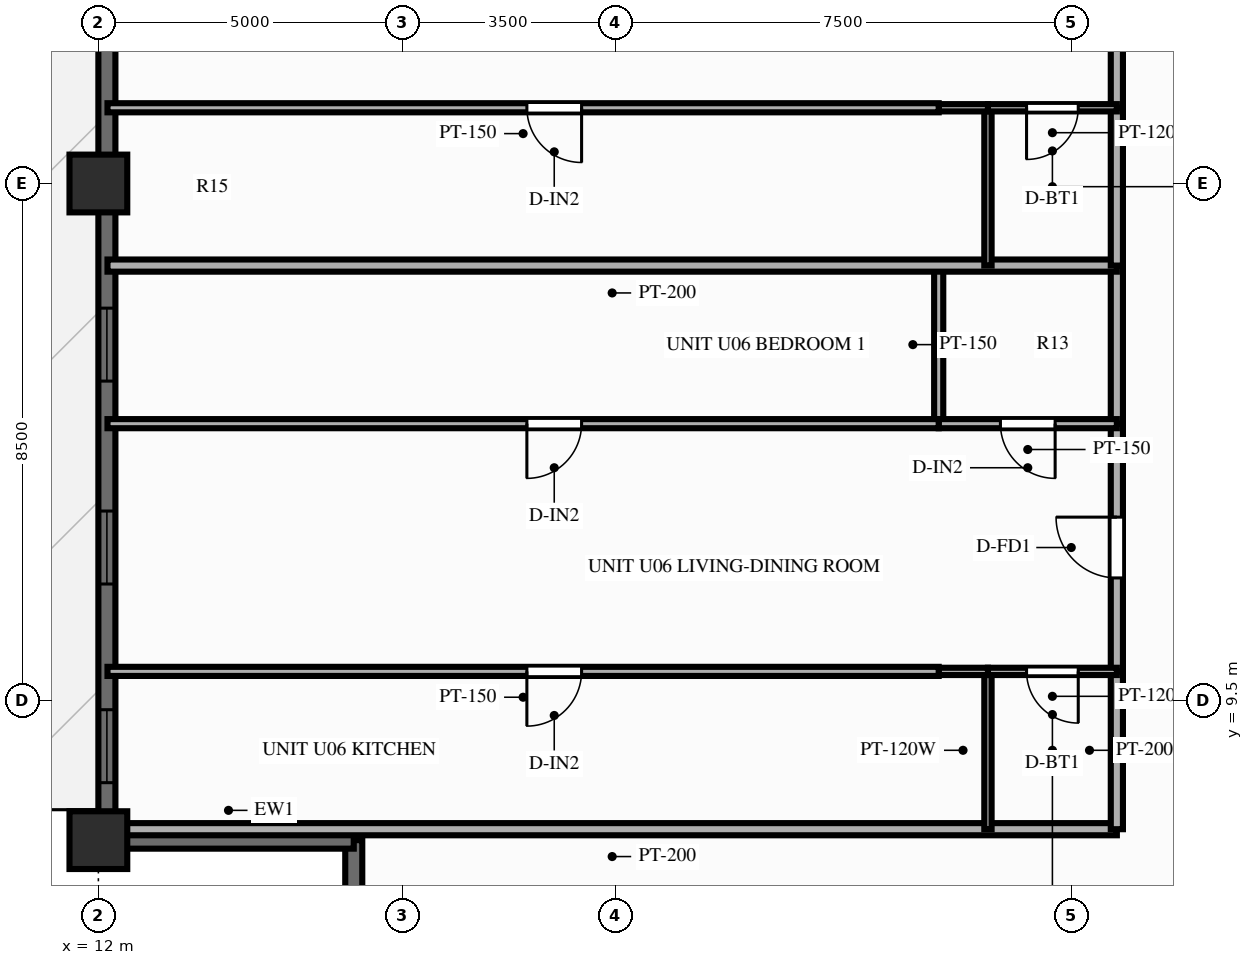
"""IFC4 building model, lengths in metres.
Left out: names, types, materials, properties, quantities, classifications, styles, units other than length and angle.
Written with IfcOpenShell. Run it as: python <this file> out.ifc"""

import sys

from ifc_helpers import new_model, si_unit, direction, frame, frame_2d, origin, origin_2d, place, context, subcontext, project, spatial, rectangle, extrude, source, transform, mapped, element, fill, save


model = new_model("IFC4")
c1 = context("Model", 3, precision=1e-05, world=origin(), true_north=direction((0.0, 1.0)))
c2 = subcontext(c1, "Body", "Model", "MODEL_VIEW")
j1 = project(units=[si_unit("LENGTHUNIT", "METRE"), si_unit("PLANEANGLEUNIT", "RADIAN")], contexts=[c1])
p1 = place(None, origin())
s1 = spatial("IfcSite", under=j1, at=p1, CompositionType="ELEMENT")
p2 = place(p1, origin())
s2 = spatial("IfcBuilding", under=s1, at=p2, CompositionType="ELEMENT")
p3 = place(p2, frame((0.0, 0.0, 110.85)))
s3 = spatial("IfcBuildingStorey", under=s2, at=p3, CompositionType="ELEMENT", Elevation=110.85)
m1 = source(origin(), c2, "Body", "SweptSolid", [
    extrude(rectangle(XDim=0.95, YDim=0.95, at=origin_2d()), origin(), (0.0, 0.0, 1.0), 3.0),
])
for number, where, z_axis, x_axis in (
    (1, (12.0, 18.0, 0.0), (0.0, 0.0, 1.0), (1.0, 0.0, 0.0)),
    (2, (12.0, 7.2, 0.0), (0.0, 0.0, 1.0), (1.0, 0.0, 0.0)),
):
    element("IfcColumn", number, at=place(p3, frame(where, z_axis=z_axis, x_axis=x_axis)), inside=s3, PredefinedType="COLUMN", context=c2, shape_type="MappedRepresentation", body=[
        mapped(m1, transform((0.0, 0.0, 0.0), scale=1.0)),
    ])
p4 = place(p3, frame((12.14, 7.2, 0.0), z_axis=(0.0, 0.0, 1.0), x_axis=(0.0, 1.0, 0.0)))
e3 = element("IfcWall", 3, at=p4, inside=s3, PredefinedType="SOLIDWALL", context=c2, shape_type="SweptSolid", body=[
    extrude(rectangle(XDim=39.6, YDim=0.28, at=frame_2d((19.8, 0.0))), origin(), (0.0, 0.0, 1.0), 2.28),
])
p5 = place(p4, frame((0.945, 0.0, 0.25)))
e4 = element("IfcOpeningElement", 4, at=p5, cuts=e3, PredefinedType="OPENING", context=c2, shape_type="SweptSolid", body=[
    extrude(rectangle(XDim=1.2, YDim=1.5, at=frame_2d((0.6, 0.75))), frame((0.0, 0.152, 0.0), z_axis=(0.0, -1.0, 0.0), x_axis=(1.0, 0.0, 0.0)), (0.0, 0.0, 1.0), 0.304),
])
p6 = place(p4, frame((4.213, 0.0, 0.25)))
e5 = element("IfcOpeningElement", 5, at=p6, cuts=e3, PredefinedType="OPENING", context=c2, shape_type="SweptSolid", body=[
    extrude(rectangle(XDim=1.2, YDim=1.5, at=frame_2d((0.6, 0.75))), frame((0.0, 0.152, 0.0), z_axis=(0.0, -1.0, 0.0), x_axis=(1.0, 0.0, 0.0)), (0.0, 0.0, 1.0), 0.304),
])
p7 = place(p4, frame((7.55, 0.0, 0.25)))
e6 = element("IfcOpeningElement", 6, at=p7, cuts=e3, PredefinedType="OPENING", context=c2, shape_type="SweptSolid", body=[
    extrude(rectangle(XDim=1.2, YDim=1.5, at=frame_2d((0.6, 0.75))), frame((0.0, 0.152, 0.0), z_axis=(0.0, -1.0, 0.0), x_axis=(1.0, 0.0, 0.0)), (0.0, 0.0, 1.0), 0.304),
])
p8 = place(p4, frame((13.483, 0.0, 0.25)))
e7 = element("IfcOpeningElement", 7, at=p8, cuts=e3, PredefinedType="OPENING", context=c2, shape_type="SweptSolid", body=[
    extrude(rectangle(XDim=1.2, YDim=1.5, at=frame_2d((0.6, 0.75))), frame((0.0, 0.152, 0.0), z_axis=(0.0, -1.0, 0.0), x_axis=(1.0, 0.0, 0.0)), (0.0, 0.0, 1.0), 0.304),
])
p9 = place(p4, frame((16.82, 0.0, 0.25)))
e8 = element("IfcOpeningElement", 8, at=p9, cuts=e3, PredefinedType="OPENING", context=c2, shape_type="SweptSolid", body=[
    extrude(rectangle(XDim=1.2, YDim=1.5, at=frame_2d((0.6, 0.75))), frame((0.0, 0.152, 0.0), z_axis=(0.0, -1.0, 0.0), x_axis=(1.0, 0.0, 0.0)), (0.0, 0.0, 1.0), 0.304),
])
p10 = place(p4, frame((19.2, 0.0, 0.25)))
e9 = element("IfcOpeningElement", 9, at=p10, cuts=e3, PredefinedType="OPENING", context=c2, shape_type="SweptSolid", body=[
    extrude(rectangle(XDim=1.2, YDim=1.5, at=frame_2d((0.6, 0.75))), frame((0.0, 0.152, 0.0), z_axis=(0.0, -1.0, 0.0), x_axis=(1.0, 0.0, 0.0)), (0.0, 0.0, 1.0), 0.304),
])
p11 = place(p4, frame((21.578, 0.0, 0.25)))
e10 = element("IfcOpeningElement", 10, at=p11, cuts=e3, PredefinedType="OPENING", context=c2, shape_type="SweptSolid", body=[
    extrude(rectangle(XDim=1.2, YDim=1.5, at=frame_2d((0.6, 0.75))), frame((0.0, 0.152, 0.0), z_axis=(0.0, -1.0, 0.0), x_axis=(1.0, 0.0, 0.0)), (0.0, 0.0, 1.0), 0.304),
])
p12 = place(p4, frame((24.713, 0.0, 0.0)))
e11 = element("IfcOpeningElement", 11, at=p12, cuts=e3, PredefinedType="OPENING", context=c2, shape_type="SweptSolid", body=[
    extrude(rectangle(XDim=1.6, YDim=2.15, at=frame_2d((0.8, 1.075))), frame((0.0, 0.152, 0.0), z_axis=(0.0, -1.0, 0.0), x_axis=(1.0, 0.0, 0.0)), (0.0, 0.0, 1.0), 0.304),
])
p13 = place(p4, frame((29.305, 0.0, 0.25)))
e12 = element("IfcOpeningElement", 12, at=p13, cuts=e3, PredefinedType="OPENING", context=c2, shape_type="SweptSolid", body=[
    extrude(rectangle(XDim=0.7, YDim=1.5, at=frame_2d((0.35, 0.75))), frame((0.0, 0.152, 0.0), z_axis=(0.0, -1.0, 0.0), x_axis=(1.0, 0.0, 0.0)), (0.0, 0.0, 1.0), 0.304),
])
p14 = place(p4, frame((30.848, 0.0, 0.25)))
e13 = element("IfcOpeningElement", 13, at=p14, cuts=e3, PredefinedType="OPENING", context=c2, shape_type="SweptSolid", body=[
    extrude(rectangle(XDim=1.2, YDim=1.5, at=frame_2d((0.6, 0.75))), frame((0.0, 0.152, 0.0), z_axis=(0.0, -1.0, 0.0), x_axis=(1.0, 0.0, 0.0)), (0.0, 0.0, 1.0), 0.304),
])
p15 = place(p4, frame((34.183, 0.0, 0.25)))
e14 = element("IfcOpeningElement", 14, at=p15, cuts=e3, PredefinedType="OPENING", context=c2, shape_type="SweptSolid", body=[
    extrude(rectangle(XDim=1.2, YDim=1.5, at=frame_2d((0.6, 0.75))), frame((0.0, 0.152, 0.0), z_axis=(0.0, -1.0, 0.0), x_axis=(1.0, 0.0, 0.0)), (0.0, 0.0, 1.0), 0.304),
])
p16 = place(p4, frame((37.452, 0.0, 0.25)))
e15 = element("IfcOpeningElement", 15, at=p16, cuts=e3, PredefinedType="OPENING", context=c2, shape_type="SweptSolid", body=[
    extrude(rectangle(XDim=1.2, YDim=1.5, at=frame_2d((0.6, 0.75))), frame((0.0, 0.152, 0.0), z_axis=(0.0, -1.0, 0.0), x_axis=(1.0, 0.0, 0.0)), (0.0, 0.0, 1.0), 0.304),
])
for number, where, z_axis, x_axis in (
    (16, (16.2, 3.08, 0.0), (0.0, 0.0, 1.0), (0.0, 1.0, 0.0)),
    (17, (12.08, 7.2, 0.0), (0.0, 0.0, 1.0), (1.0, 0.0, 0.0)),
):
    element("IfcWall", number, at=place(p3, frame(where, z_axis=z_axis, x_axis=x_axis)), inside=s3, PredefinedType="SOLIDWALL", context=c2, shape_type="SweptSolid", body=[
        extrude(rectangle(XDim=4.12, YDim=0.28, at=frame_2d((2.06, 0.0))), origin(), (0.0, 0.0, 1.0), 2.28),
    ])
p17 = place(p3, frame((28.75, 7.38, 0.0), z_axis=(0.0, 0.0, 1.0), x_axis=(-1.0, 0.0, 0.0)))
e18 = element("IfcWall", 18, at=p17, inside=s3, PredefinedType="PARTITIONING", context=c2, shape_type="SweptSolid", body=[
    extrude(rectangle(XDim=16.6, YDim=0.2, at=frame_2d((8.3, 0.0))), origin(), (0.0, 0.0, 1.0), 2.79),
])
p18 = place(p3, frame((28.75, 7.38, 0.0), z_axis=(0.0, 0.0, 1.0), x_axis=(0.0, 1.0, 0.0)))
e19 = element("IfcWall", 19, at=p18, inside=s3, PredefinedType="PARTITIONING", context=c2, shape_type="SweptSolid", body=[
    extrude(rectangle(XDim=2.596, YDim=0.2, at=frame_2d((1.298, 0.0))), origin(), (0.0, 0.0, 1.0), 2.79),
])
p19 = place(p3, frame((28.75, 9.976, 0.0), z_axis=(0.0, 0.0, 1.0), x_axis=(0.0, 1.0, 0.0)))
e20 = element("IfcWall", 20, at=p19, inside=s3, PredefinedType="PARTITIONING", context=c2, shape_type="SweptSolid", body=[
    extrude(rectangle(XDim=4.074, YDim=0.2, at=frame_2d((2.037, 0.0))), origin(), (0.0, 0.0, 1.0), 2.79),
])
p20 = place(p19, frame((1.537, 0.0, 0.0)))
e21 = element("IfcOpeningElement", 21, at=p20, cuts=e20, PredefinedType="OPENING", context=c2, shape_type="SweptSolid", body=[
    extrude(rectangle(XDim=1.0, YDim=2.15, at=frame_2d((0.5, 1.075))), frame((0.0, 0.112, 0.0), z_axis=(0.0, -1.0, 0.0), x_axis=(1.0, 0.0, 0.0)), (0.0, 0.0, 1.0), 0.224),
])
p21 = place(p3, frame((28.75, 14.05, 0.0), z_axis=(0.0, 0.0, 1.0), x_axis=(0.0, 1.0, 0.0)))
e22 = element("IfcWall", 22, at=p21, inside=s3, PredefinedType="PARTITIONING", context=c2, shape_type="SweptSolid", body=[
    extrude(rectangle(XDim=2.6, YDim=0.2, at=frame_2d((1.3, 0.0))), origin(), (0.0, 0.0, 1.0), 2.79),
])
p22 = place(p3, frame((26.63, 7.38, 0.0), z_axis=(0.0, 0.0, 1.0), x_axis=(0.0, 1.0, 0.0)))
e23 = element("IfcWall", 23, at=p22, inside=s3, PredefinedType="PARTITIONING", context=c2, shape_type="SweptSolid", body=[
    extrude(rectangle(XDim=2.596, YDim=0.12, at=frame_2d((1.298, 0.0))), origin(), (0.0, 0.0, 1.0), 2.79),
])
p23 = place(p3, frame((25.82, 14.05, 0.0), z_axis=(0.0, 0.0, 1.0), x_axis=(0.0, 1.0, 0.0)))
e24 = element("IfcWall", 24, at=p23, inside=s3, PredefinedType="PARTITIONING", context=c2, shape_type="SweptSolid", body=[
    extrude(rectangle(XDim=2.6, YDim=0.15, at=frame_2d((1.3, 0.0))), origin(), (0.0, 0.0, 1.0), 2.79),
])
p24 = place(p3, frame((28.75, 9.976, 0.0), z_axis=(0.0, 0.0, 1.0), x_axis=(-1.0, 0.0, 0.0)))
e25 = element("IfcWall", 25, at=p24, inside=s3, PredefinedType="PARTITIONING", context=c2, shape_type="SweptSolid", body=[
    extrude(rectangle(XDim=2.12, YDim=0.12, at=frame_2d((1.06, 0.0))), origin(), (0.0, 0.0, 1.0), 2.79),
])
p25 = place(p24, frame((0.635, 0.0, 0.0)))
e26 = element("IfcOpeningElement", 26, at=p25, cuts=e25, PredefinedType="OPENING", context=c2, shape_type="SweptSolid", body=[
    extrude(rectangle(XDim=0.85, YDim=2.05, at=frame_2d((0.425, 1.025))), frame((0.0, 0.072, 0.0), z_axis=(0.0, -1.0, 0.0), x_axis=(1.0, 0.0, 0.0)), (0.0, 0.0, 1.0), 0.144),
])
p26 = place(p3, frame((26.63, 9.976, 0.0), z_axis=(0.0, 0.0, 1.0), x_axis=(-1.0, 0.0, 0.0)))
e27 = element("IfcWall", 27, at=p26, inside=s3, PredefinedType="PARTITIONING", context=c2, shape_type="SweptSolid", body=[
    extrude(rectangle(XDim=0.81, YDim=0.12, at=frame_2d((0.405, 0.0))), origin(), (0.0, 0.0, 1.0), 2.79),
])
p27 = place(p3, frame((25.82, 9.976, 0.0), z_axis=(0.0, 0.0, 1.0), x_axis=(-1.0, 0.0, 0.0)))
e28 = element("IfcWall", 28, at=p27, inside=s3, PredefinedType="PARTITIONING", context=c2, shape_type="SweptSolid", body=[
    extrude(rectangle(XDim=13.67, YDim=0.15, at=frame_2d((6.835, 0.0))), origin(), (0.0, 0.0, 1.0), 2.79),
])
p28 = place(p27, frame((5.873, 0.0, 0.0)))
e29 = element("IfcOpeningElement", 29, at=p28, cuts=e28, PredefinedType="OPENING", context=c2, shape_type="SweptSolid", body=[
    extrude(rectangle(XDim=0.9, YDim=2.1, at=frame_2d((0.45, 1.05))), frame((0.0, 0.087, 0.0), z_axis=(0.0, -1.0, 0.0), x_axis=(1.0, 0.0, 0.0)), (0.0, 0.0, 1.0), 0.174),
])
p29 = place(p3, frame((28.75, 14.05, 0.0), z_axis=(0.0, 0.0, 1.0), x_axis=(-1.0, 0.0, 0.0)))
e30 = element("IfcWall", 30, at=p29, inside=s3, PredefinedType="PARTITIONING", context=c2, shape_type="SweptSolid", body=[
    extrude(rectangle(XDim=2.93, YDim=0.15, at=frame_2d((1.465, 0.0))), origin(), (0.0, 0.0, 1.0), 2.79),
])
p30 = place(p29, frame((1.015, 0.0, 0.0)))
e31 = element("IfcOpeningElement", 31, at=p30, cuts=e30, PredefinedType="OPENING", context=c2, shape_type="SweptSolid", body=[
    extrude(rectangle(XDim=0.9, YDim=2.1, at=frame_2d((0.45, 1.05))), frame((0.0, 0.087, 0.0), z_axis=(0.0, -1.0, 0.0), x_axis=(1.0, 0.0, 0.0)), (0.0, 0.0, 1.0), 0.174),
])
p31 = place(p3, frame((25.82, 14.05, 0.0), z_axis=(0.0, 0.0, 1.0), x_axis=(-1.0, 0.0, 0.0)))
e32 = element("IfcWall", 32, at=p31, inside=s3, PredefinedType="PARTITIONING", context=c2, shape_type="SweptSolid", body=[
    extrude(rectangle(XDim=13.67, YDim=0.15, at=frame_2d((6.835, 0.0))), origin(), (0.0, 0.0, 1.0), 2.79),
])
p32 = place(p31, frame((5.873, 0.0, 0.0)))
e33 = element("IfcOpeningElement", 33, at=p32, cuts=e32, PredefinedType="OPENING", context=c2, shape_type="SweptSolid", body=[
    extrude(rectangle(XDim=0.9, YDim=2.1, at=frame_2d((0.45, 1.05))), frame((0.0, 0.087, 0.0), z_axis=(0.0, -1.0, 0.0), x_axis=(1.0, 0.0, 0.0)), (0.0, 0.0, 1.0), 0.174),
])
p33 = place(p3, frame((28.75, 16.65, 0.0), z_axis=(0.0, 0.0, 1.0), x_axis=(-1.0, 0.0, 0.0)))
e34 = element("IfcWall", 34, at=p33, inside=s3, PredefinedType="PARTITIONING", context=c2, shape_type="SweptSolid", body=[
    extrude(rectangle(XDim=16.6, YDim=0.2, at=frame_2d((8.3, 0.0))), origin(), (0.0, 0.0, 1.0), 2.79),
])
p34 = place(p3, frame((28.75, 16.65, 0.0), z_axis=(0.0, 0.0, 1.0), x_axis=(0.0, 1.0, 0.0)))
e35 = element("IfcWall", 35, at=p34, inside=s3, PredefinedType="PARTITIONING", context=c2, shape_type="SweptSolid", body=[
    extrude(rectangle(XDim=2.596, YDim=0.2, at=frame_2d((1.298, 0.0))), origin(), (0.0, 0.0, 1.0), 2.79),
])
p35 = place(p3, frame((28.75, 19.246, 0.0), z_axis=(0.0, 0.0, 1.0), x_axis=(0.0, 1.0, 0.0)))
e36 = element("IfcWall", 36, at=p35, inside=s3, PredefinedType="PARTITIONING", context=c2, shape_type="SweptSolid", body=[
    extrude(rectangle(XDim=4.074, YDim=0.2, at=frame_2d((2.037, 0.0))), origin(), (0.0, 0.0, 1.0), 2.79),
])
p36 = place(p35, frame((1.537, 0.0, 0.0)))
e37 = element("IfcOpeningElement", 37, at=p36, cuts=e36, PredefinedType="OPENING", context=c2, shape_type="SweptSolid", body=[
    extrude(rectangle(XDim=1.0, YDim=2.15, at=frame_2d((0.5, 1.075))), frame((0.0, 0.112, 0.0), z_axis=(0.0, -1.0, 0.0), x_axis=(1.0, 0.0, 0.0)), (0.0, 0.0, 1.0), 0.224),
])
p37 = place(p3, frame((26.63, 16.65, 0.0), z_axis=(0.0, 0.0, 1.0), x_axis=(0.0, 1.0, 0.0)))
e38 = element("IfcWall", 38, at=p37, inside=s3, PredefinedType="PARTITIONING", context=c2, shape_type="SweptSolid", body=[
    extrude(rectangle(XDim=2.596, YDim=0.12, at=frame_2d((1.298, 0.0))), origin(), (0.0, 0.0, 1.0), 2.79),
])
p38 = place(p3, frame((28.75, 19.246, 0.0), z_axis=(0.0, 0.0, 1.0), x_axis=(-1.0, 0.0, 0.0)))
e39 = element("IfcWall", 39, at=p38, inside=s3, PredefinedType="PARTITIONING", context=c2, shape_type="SweptSolid", body=[
    extrude(rectangle(XDim=2.12, YDim=0.12, at=frame_2d((1.06, 0.0))), origin(), (0.0, 0.0, 1.0), 2.79),
])
p39 = place(p38, frame((0.635, 0.0, 0.0)))
e40 = element("IfcOpeningElement", 40, at=p39, cuts=e39, PredefinedType="OPENING", context=c2, shape_type="SweptSolid", body=[
    extrude(rectangle(XDim=0.85, YDim=2.05, at=frame_2d((0.425, 1.025))), frame((0.0, 0.072, 0.0), z_axis=(0.0, -1.0, 0.0), x_axis=(1.0, 0.0, 0.0)), (0.0, 0.0, 1.0), 0.144),
])
p40 = place(p3, frame((26.63, 19.246, 0.0), z_axis=(0.0, 0.0, 1.0), x_axis=(-1.0, 0.0, 0.0)))
e41 = element("IfcWall", 41, at=p40, inside=s3, PredefinedType="PARTITIONING", context=c2, shape_type="SweptSolid", body=[
    extrude(rectangle(XDim=0.81, YDim=0.12, at=frame_2d((0.405, 0.0))), origin(), (0.0, 0.0, 1.0), 2.79),
])
p41 = place(p3, frame((25.82, 19.246, 0.0), z_axis=(0.0, 0.0, 1.0), x_axis=(-1.0, 0.0, 0.0)))
e42 = element("IfcWall", 42, at=p41, inside=s3, PredefinedType="PARTITIONING", context=c2, shape_type="SweptSolid", body=[
    extrude(rectangle(XDim=13.67, YDim=0.15, at=frame_2d((6.835, 0.0))), origin(), (0.0, 0.0, 1.0), 2.79),
])
p42 = place(p41, frame((5.873, 0.0, 0.0)))
e43 = element("IfcOpeningElement", 43, at=p42, cuts=e42, PredefinedType="OPENING", context=c2, shape_type="SweptSolid", body=[
    extrude(rectangle(XDim=0.9, YDim=2.1, at=frame_2d((0.45, 1.05))), frame((0.0, 0.087, 0.0), z_axis=(0.0, -1.0, 0.0), x_axis=(1.0, 0.0, 0.0)), (0.0, 0.0, 1.0), 0.174),
])
m2 = source(origin(), c2, "Body", "SweptSolid", [
    extrude(rectangle(XDim=1.2, YDim=1.5, at=frame_2d((0.6, 0.75))), frame((0.0, 0.03, 0.0), z_axis=(0.0, -1.0, 0.0), x_axis=(1.0, 0.0, 0.0)), (0.0, 0.0, 1.0), 0.06),
])
p43 = place(p5, origin())
e44 = element("IfcWindow", 44, at=p43, inside=s3, PartitioningType="SINGLE_PANEL", PredefinedType="WINDOW", context=c2, shape_type="MappedRepresentation", body=[
    mapped(m2, transform((0.0, 0.0, 0.0), scale=1.0)),
])
fill(e4, e44)
p44 = place(p6, origin())
e45 = element("IfcWindow", 45, at=p44, inside=s3, PartitioningType="SINGLE_PANEL", PredefinedType="WINDOW", context=c2, shape_type="MappedRepresentation", body=[
    mapped(m2, transform((0.0, 0.0, 0.0), scale=1.0)),
])
fill(e5, e45)
p45 = place(p7, origin())
e46 = element("IfcWindow", 46, at=p45, inside=s3, PartitioningType="SINGLE_PANEL", PredefinedType="WINDOW", context=c2, shape_type="MappedRepresentation", body=[
    mapped(m2, transform((0.0, 0.0, 0.0), scale=1.0)),
])
fill(e6, e46)
m3 = source(origin(), c2, "Body", "SweptSolid", [
    extrude(rectangle(XDim=1.0, YDim=2.15, at=frame_2d((0.5, 1.075))), frame((0.0, 0.025, 0.0), z_axis=(0.0, -1.0, 0.0), x_axis=(1.0, 0.0, 0.0)), (0.0, 0.0, 1.0), 0.05),
])
p46 = place(p20, origin())
e47 = element("IfcDoor", 47, at=p46, inside=s3, OperationType="SINGLE_SWING_RIGHT", PredefinedType="DOOR", context=c2, shape_type="MappedRepresentation", body=[
    mapped(m3, transform((0.0, 0.0, 0.0), scale=1.0)),
])
fill(e21, e47)
m4 = source(origin(), c2, "Body", "SweptSolid", [
    extrude(rectangle(XDim=0.85, YDim=2.05, at=frame_2d((0.425, 1.025))), frame((0.0, 0.025, 0.0), z_axis=(0.0, -1.0, 0.0), x_axis=(1.0, 0.0, 0.0)), (0.0, 0.0, 1.0), 0.05),
])
p47 = place(p25, origin())
e48 = element("IfcDoor", 48, at=p47, inside=s3, OperationType="SINGLE_SWING_LEFT", PredefinedType="DOOR", context=c2, shape_type="MappedRepresentation", body=[
    mapped(m4, transform((0.0, 0.0, 0.0), scale=1.0)),
])
fill(e26, e48)
m5 = source(origin(), c2, "Body", "SweptSolid", [
    extrude(rectangle(XDim=0.9, YDim=2.1, at=frame_2d((0.45, 1.05))), frame((0.0, 0.025, 0.0), z_axis=(0.0, -1.0, 0.0), x_axis=(1.0, 0.0, 0.0)), (0.0, 0.0, 1.0), 0.05),
])
p48 = place(p28, origin())
e49 = element("IfcDoor", 49, at=p48, inside=s3, OperationType="SINGLE_SWING_RIGHT", PredefinedType="DOOR", context=c2, shape_type="MappedRepresentation", body=[
    mapped(m5, transform((0.0, 0.0, 0.0), scale=1.0)),
])
fill(e29, e49)
p49 = place(p30, origin())
e50 = element("IfcDoor", 50, at=p49, inside=s3, OperationType="SINGLE_SWING_LEFT", PredefinedType="DOOR", context=c2, shape_type="MappedRepresentation", body=[
    mapped(m5, transform((0.0, 0.0, 0.0), scale=1.0)),
])
fill(e31, e50)
p50 = place(p32, origin())
e51 = element("IfcDoor", 51, at=p50, inside=s3, OperationType="SINGLE_SWING_RIGHT", PredefinedType="DOOR", context=c2, shape_type="MappedRepresentation", body=[
    mapped(m5, transform((0.0, 0.0, 0.0), scale=1.0)),
])
fill(e33, e51)
p51 = place(p39, origin())
e52 = element("IfcDoor", 52, at=p51, inside=s3, OperationType="SINGLE_SWING_RIGHT", PredefinedType="DOOR", context=c2, shape_type="MappedRepresentation", body=[
    mapped(m4, transform((0.0, 0.0, 0.0), scale=1.0)),
])
fill(e40, e52)
p52 = place(p42, origin())
e53 = element("IfcDoor", 53, at=p52, inside=s3, OperationType="SINGLE_SWING_LEFT", PredefinedType="DOOR", context=c2, shape_type="MappedRepresentation", body=[
    mapped(m5, transform((0.0, 0.0, 0.0), scale=1.0)),
])
fill(e43, e53)
save(model, sys.argv[1])
